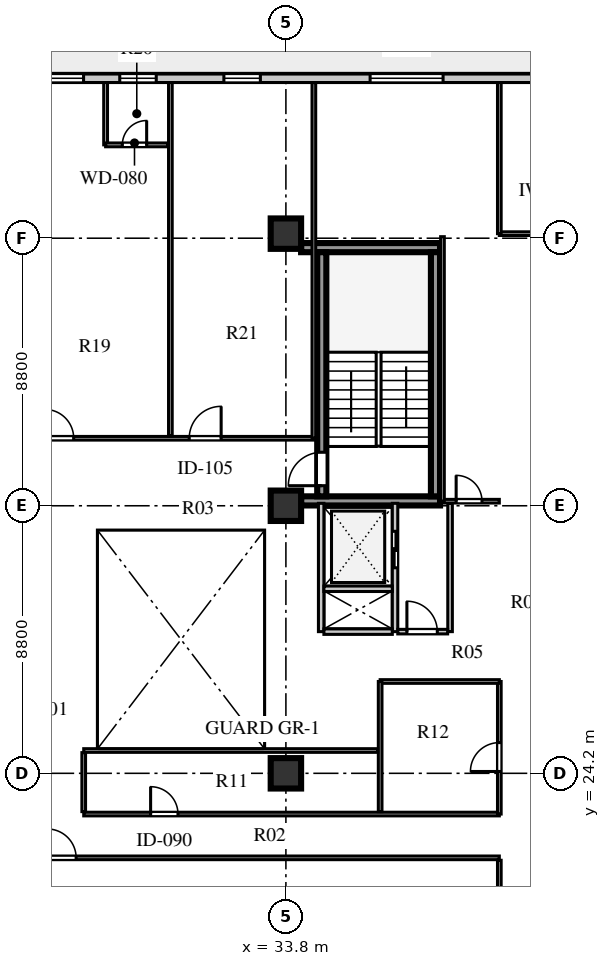
"""IFC4 building model, lengths in metres.
Left out: names, types, materials, properties, quantities, classifications, styles, units other than length and angle.
Written with IfcOpenShell. Run it as: python <this file> out.ifc"""

import sys

from ifc_helpers import new_model, si_unit, direction, frame, frame_2d, origin, origin_2d, place, context, subcontext, project, spatial, rectangle, extrude, element, fill, save


model = new_model("IFC4")
c1 = context("Model", 3, precision=1e-05, world=origin(), true_north=direction((0.0, 1.0)))
c2 = subcontext(c1, "Body", "Model", "MODEL_VIEW")
j1 = project(units=[si_unit("LENGTHUNIT", "METRE"), si_unit("PLANEANGLEUNIT", "RADIAN")], contexts=[c1])
p1 = place(None, origin())
s1 = spatial("IfcSite", under=j1, at=p1, CompositionType="ELEMENT")
p2 = place(p1, origin())
s2 = spatial("IfcBuilding", under=s1, at=p2, CompositionType="ELEMENT")
p3 = place(p2, frame((0.0, 0.0, 111.7)))
s3 = spatial("IfcBuildingStorey", under=s2, at=p3, CompositionType="ELEMENT", Elevation=111.7)
for number, where, z_axis, x_axis in (
    (1, (34.3, 33.16, 0.0), (0.0, 0.0, 1.0), (1.0, 0.0, 0.0)),
    (2, (34.3, 41.49, 0.0), (0.0, 0.0, 1.0), (1.0, 0.0, 0.0)),
):
    element("IfcWall", number, at=place(p3, frame(where, z_axis=z_axis, x_axis=x_axis)), inside=s3, PredefinedType="SHEAR", context=c2, shape_type="SweptSolid", body=[
        extrude(rectangle(XDim=4.57, YDim=0.3, at=frame_2d((2.285, 0.0))), origin(), (0.0, 0.0, 1.0), 3.6),
    ])
p4 = place(p3, frame((34.98, 33.31, 0.0), z_axis=(0.0, 0.0, 1.0), x_axis=(0.0, 1.0, 0.0)))
e3 = element("IfcWall", 3, at=p4, inside=s3, PredefinedType="SHEAR", context=c2, shape_type="SweptSolid", body=[
    extrude(rectangle(XDim=8.03, YDim=0.3, at=frame_2d((4.015, 0.0))), origin(), (0.0, 0.0, 1.0), 3.6),
])
p5 = place(p4, frame((0.35, 0.0, 0.0)))
e4 = element("IfcOpeningElement", 4, at=p5, cuts=e3, PredefinedType="OPENING", context=c2, shape_type="SweptSolid", body=[
    extrude(rectangle(XDim=1.1, YDim=2.1, at=frame_2d((0.55, 1.05))), frame((0.0, 0.16, 0.0), z_axis=(0.0, -1.0, 0.0), x_axis=(1.0, 0.0, 0.0)), (0.0, 0.0, 1.0), 0.32),
])
p6 = place(p3, frame((38.72, 33.31, 0.0), z_axis=(0.0, 0.0, 1.0), x_axis=(0.0, 1.0, 0.0)))
e5 = element("IfcWall", 5, at=p6, inside=s3, PredefinedType="SHEAR", context=c2, shape_type="SweptSolid", body=[
    extrude(rectangle(XDim=8.03, YDim=0.3, at=frame_2d((4.015, 0.0))), origin(), (0.0, 0.0, 1.0), 3.6),
])
for number, where, z_axis, x_axis in (
    (6, (33.8, 24.2, 0.0), (0.0, 0.0, 1.0), (1.0, 0.0, 0.0)),
    (7, (33.8, 33.0, 0.0), (0.0, 0.0, 1.0), (1.0, 0.0, 0.0)),
    (8, (33.8, 41.95, 0.0), (0.0, 0.0, 1.0), (1.0, 0.0, 0.0)),
):
    element("IfcColumn", number, at=place(p3, frame(where, z_axis=z_axis, x_axis=x_axis)), inside=s3, PredefinedType="COLUMN", context=c2, shape_type="SweptSolid", body=[
        extrude(rectangle(XDim=1.0, YDim=1.0, at=origin_2d()), origin(), (0.0, 0.0, 1.0), 3.6),
    ])
p7 = place(p3, frame((45.35, 47.06, 0.0), z_axis=(0.0, 0.0, 1.0), x_axis=(-1.0, 0.0, 0.0)))
e9 = element("IfcWall", 9, at=p7, inside=s3, PredefinedType="STANDARD", context=c2, shape_type="SweptSolid", body=[
    extrude(rectangle(XDim=32.1, YDim=0.28, at=frame_2d((16.05, 0.0))), origin(), (0.0, 0.0, 1.0), 3.6),
])
p8 = place(p7, frame((30.15, 0.0, 0.0)))
e10 = element("IfcOpeningElement", 10, at=p8, cuts=e9, PredefinedType="OPENING", context=c2, shape_type="SweptSolid", body=[
    extrude(rectangle(XDim=1.0, YDim=2.05, at=frame_2d((0.5, 1.025))), frame((0.0, 0.15, 0.0), z_axis=(0.0, -1.0, 0.0), x_axis=(1.0, 0.0, 0.0)), (0.0, 0.0, 1.0), 0.3),
])
p9 = place(p7, frame((24.045, 0.0, 0.8)))
e11 = element("IfcOpeningElement", 11, at=p9, cuts=e9, PredefinedType="OPENING", context=c2, shape_type="SweptSolid", body=[
    extrude(rectangle(XDim=2.25, YDim=2.0, at=frame_2d((1.125, 1.0))), frame((0.0, 0.15, 0.0), z_axis=(0.0, -1.0, 0.0), x_axis=(1.0, 0.0, 0.0)), (0.0, 0.0, 1.0), 0.3),
])
p10 = place(p7, frame((18.205, 0.0, 0.8)))
e12 = element("IfcOpeningElement", 12, at=p10, cuts=e9, PredefinedType="OPENING", context=c2, shape_type="SweptSolid", body=[
    extrude(rectangle(XDim=1.2, YDim=1.75, at=frame_2d((0.6, 0.875))), frame((0.0, 0.15, 0.0), z_axis=(0.0, -1.0, 0.0), x_axis=(1.0, 0.0, 0.0)), (0.0, 0.0, 1.0), 0.3),
])
p11 = place(p7, frame((15.815, 0.0, 0.8)))
e13 = element("IfcOpeningElement", 13, at=p11, cuts=e9, PredefinedType="OPENING", context=c2, shape_type="SweptSolid", body=[
    extrude(rectangle(XDim=1.2, YDim=1.75, at=frame_2d((0.6, 0.875))), frame((0.0, 0.15, 0.0), z_axis=(0.0, -1.0, 0.0), x_axis=(1.0, 0.0, 0.0)), (0.0, 0.0, 1.0), 0.3),
])
p12 = place(p7, frame((12.39, 0.0, 0.8)))
e14 = element("IfcOpeningElement", 14, at=p12, cuts=e9, PredefinedType="OPENING", context=c2, shape_type="SweptSolid", body=[
    extrude(rectangle(XDim=1.2, YDim=1.75, at=frame_2d((0.6, 0.875))), frame((0.0, 0.15, 0.0), z_axis=(0.0, -1.0, 0.0), x_axis=(1.0, 0.0, 0.0)), (0.0, 0.0, 1.0), 0.3),
])
p13 = place(p7, frame((6.38, 0.0, 0.8)))
e15 = element("IfcOpeningElement", 15, at=p13, cuts=e9, PredefinedType="OPENING", context=c2, shape_type="SweptSolid", body=[
    extrude(rectangle(XDim=2.4, YDim=2.05, at=frame_2d((1.2, 1.025))), frame((0.0, 0.15, 0.0), z_axis=(0.0, -1.0, 0.0), x_axis=(1.0, 0.0, 0.0)), (0.0, 0.0, 1.0), 0.3),
])
p14 = place(p7, frame((1.27, 0.0, 0.8)))
e16 = element("IfcOpeningElement", 16, at=p14, cuts=e9, PredefinedType="OPENING", context=c2, shape_type="SweptSolid", body=[
    extrude(rectangle(XDim=2.1, YDim=1.95, at=frame_2d((1.05, 0.975))), frame((0.0, 0.15, 0.0), z_axis=(0.0, -1.0, 0.0), x_axis=(1.0, 0.0, 0.0)), (0.0, 0.0, 1.0), 0.3),
])
p15 = place(p3, frame((34.96, 28.86, 0.0), z_axis=(0.0, 0.0, 1.0), x_axis=(0.0, 1.0, 0.0)))
e17 = element("IfcWall", 17, at=p15, inside=s3, PredefinedType="SOLIDWALL", context=c2, shape_type="SweptSolid", body=[
    extrude(rectangle(XDim=4.22, YDim=0.18, at=frame_2d((2.11, 0.0))), origin(), (0.0, 0.0, 1.0), 3.6),
])
p16 = place(p3, frame((37.39, 28.86, 0.0), z_axis=(0.0, 0.0, 1.0), x_axis=(0.0, 1.0, 0.0)))
e18 = element("IfcWall", 18, at=p16, inside=s3, PredefinedType="SOLIDWALL", context=c2, shape_type="SweptSolid", body=[
    extrude(rectangle(XDim=4.22, YDim=0.18, at=frame_2d((2.11, 0.0))), origin(), (0.0, 0.0, 1.0), 3.6),
])
p17 = place(p16, frame((2.1, 0.0, 0.0)))
e19 = element("IfcOpeningElement", 19, at=p17, cuts=e18, PredefinedType="OPENING", context=c2, shape_type="SweptSolid", body=[
    extrude(rectangle(XDim=1.2, YDim=2.12, at=frame_2d((0.6, 1.06))), frame((0.0, 0.1, 0.0), z_axis=(0.0, -1.0, 0.0), x_axis=(1.0, 0.0, 0.0)), (0.0, 0.0, 1.0), 0.2),
])
for number, where, z_axis, x_axis in (
    (20, (35.05, 28.86, 0.0), (0.0, 0.0, 1.0), (1.0, 0.0, 0.0)),
    (21, (35.05, 30.27, 0.0), (0.0, 0.0, 1.0), (1.0, 0.0, 0.0)),
):
    element("IfcWall", number, at=place(p3, frame(where, z_axis=z_axis, x_axis=x_axis)), inside=s3, PredefinedType="SOLIDWALL", context=c2, shape_type="SweptSolid", body=[
        extrude(rectangle(XDim=2.25, YDim=0.18, at=frame_2d((1.125, 0.0))), origin(), (0.0, 0.0, 1.0), 3.6),
    ])
p18 = place(p3, frame((39.2, 28.86, 0.0), z_axis=(0.0, 0.0, 1.0), x_axis=(0.0, 1.0, 0.0)))
e22 = element("IfcWall", 22, at=p18, inside=s3, PredefinedType="PARTITIONING", context=c2, shape_type="SweptSolid", body=[
    extrude(rectangle(XDim=4.22, YDim=0.15, at=frame_2d((2.11, 0.0))), origin(), (0.0, 0.0, 1.0), 3.6),
])
p19 = place(p3, frame((37.48, 28.86, 0.0), z_axis=(0.0, 0.0, 1.0), x_axis=(1.0, 0.0, 0.0)))
e23 = element("IfcWall", 23, at=p19, inside=s3, PredefinedType="PARTITIONING", context=c2, shape_type="SweptSolid", body=[
    extrude(rectangle(XDim=1.64, YDim=0.15, at=frame_2d((0.82, 0.0))), origin(), (0.0, 0.0, 1.0), 3.6),
])
p20 = place(p19, frame((0.3, 0.0, 0.0)))
e24 = element("IfcOpeningElement", 24, at=p20, cuts=e23, PredefinedType="OPENING", context=c2, shape_type="SweptSolid", body=[
    extrude(rectangle(XDim=1.0, YDim=2.1, at=frame_2d((0.5, 1.05))), frame((0.0, 0.085, 0.0), z_axis=(0.0, -1.0, 0.0), x_axis=(1.0, 0.0, 0.0)), (0.0, 0.0, 1.0), 0.17),
])
p21 = place(p3, frame((25.22, 21.42, 0.0), z_axis=(0.0, 0.0, 1.0), x_axis=(1.0, 0.0, 0.0)))
e25 = element("IfcWall", 25, at=p21, inside=s3, PredefinedType="PARTITIONING", context=c2, shape_type="SweptSolid", body=[
    extrude(rectangle(XDim=15.6, YDim=0.12, at=frame_2d((7.8, 0.0))), origin(), (0.0, 0.0, 1.0), 3.2),
])
p22 = place(p21, frame((0.73, 0.0, 0.0)))
e26 = element("IfcOpeningElement", 26, at=p22, cuts=e25, PredefinedType="OPENING", context=c2, shape_type="SweptSolid", body=[
    extrude(rectangle(XDim=0.95, YDim=2.1, at=frame_2d((0.475, 1.05))), frame((0.0, 0.07, 0.0), z_axis=(0.0, -1.0, 0.0), x_axis=(1.0, 0.0, 0.0)), (0.0, 0.0, 1.0), 0.14),
])
p23 = place(p3, frame((27.15, 22.86, 0.0), z_axis=(0.0, 0.0, 1.0), x_axis=(1.0, 0.0, 0.0)))
e27 = element("IfcWall", 27, at=p23, inside=s3, PredefinedType="PARTITIONING", context=c2, shape_type="SweptSolid", body=[
    extrude(rectangle(XDim=13.67, YDim=0.12, at=frame_2d((6.835, 0.0))), origin(), (0.0, 0.0, 1.0), 3.6),
])
p24 = place(p23, frame((2.2, 0.0, 0.0)))
e28 = element("IfcOpeningElement", 28, at=p24, cuts=e27, PredefinedType="OPENING", context=c2, shape_type="SweptSolid", body=[
    extrude(rectangle(XDim=0.9, YDim=2.08, at=frame_2d((0.45, 1.04))), frame((0.0, 0.07, 0.0), z_axis=(0.0, -1.0, 0.0), x_axis=(1.0, 0.0, 0.0)), (0.0, 0.0, 1.0), 0.14),
])
p25 = place(p3, frame((25.22, 35.22, 0.0), z_axis=(0.0, 0.0, 1.0), x_axis=(1.0, 0.0, 0.0)))
e29 = element("IfcWall", 29, at=p25, inside=s3, PredefinedType="PARTITIONING", context=c2, shape_type="SweptSolid", body=[
    extrude(rectangle(XDim=9.5, YDim=0.12, at=frame_2d((4.75, 0.0))), origin(), (0.0, 0.0, 1.0), 3.6),
])
p26 = place(p25, frame((0.65, 0.0, 0.0)))
e30 = element("IfcOpeningElement", 30, at=p26, cuts=e29, PredefinedType="OPENING", context=c2, shape_type="SweptSolid", body=[
    extrude(rectangle(XDim=0.95, YDim=2.1, at=frame_2d((0.475, 1.05))), frame((0.0, 0.07, 0.0), z_axis=(0.0, -1.0, 0.0), x_axis=(1.0, 0.0, 0.0)), (0.0, 0.0, 1.0), 0.14),
])
p27 = place(p25, frame((5.4, 0.0, 0.0)))
e31 = element("IfcOpeningElement", 31, at=p27, cuts=e29, PredefinedType="OPENING", context=c2, shape_type="SweptSolid", body=[
    extrude(rectangle(XDim=1.05, YDim=2.1, at=frame_2d((0.525, 1.05))), frame((0.0, 0.07, 0.0), z_axis=(0.0, -1.0, 0.0), x_axis=(1.0, 0.0, 0.0)), (0.0, 0.0, 1.0), 0.14),
])
p28 = place(p3, frame((40.82, 41.95, 0.0), z_axis=(0.0, 0.0, 1.0), x_axis=(1.0, 0.0, 0.0)))
e32 = element("IfcWall", 32, at=p28, inside=s3, PredefinedType="PARTITIONING", context=c2, shape_type="SweptSolid", body=[
    extrude(rectangle(XDim=7.3, YDim=0.12, at=frame_2d((3.65, 0.0))), origin(), (0.0, 0.0, 1.0), 2.95),
])
p29 = place(p3, frame((40.82, 22.86, 0.0), z_axis=(0.0, 0.0, 1.0), x_axis=(0.0, 1.0, 0.0)))
e33 = element("IfcWall", 33, at=p29, inside=s3, PredefinedType="PARTITIONING", context=c2, shape_type="SweptSolid", body=[
    extrude(rectangle(XDim=4.36, YDim=0.12, at=frame_2d((2.18, 0.0))), origin(), (0.0, 0.0, 1.0), 3.6),
])
p30 = place(p29, frame((1.4, 0.0, 0.0)))
e34 = element("IfcOpeningElement", 34, at=p30, cuts=e33, PredefinedType="OPENING", context=c2, shape_type="SweptSolid", body=[
    extrude(rectangle(XDim=0.95, YDim=2.1, at=frame_2d((0.475, 1.05))), frame((0.0, 0.07, 0.0), z_axis=(0.0, -1.0, 0.0), x_axis=(1.0, 0.0, 0.0)), (0.0, 0.0, 1.0), 0.14),
])
p31 = place(p3, frame((36.9, 27.22, 0.0), z_axis=(0.0, 0.0, 1.0), x_axis=(1.0, 0.0, 0.0)))
e35 = element("IfcWall", 35, at=p31, inside=s3, PredefinedType="PARTITIONING", context=c2, shape_type="SweptSolid", body=[
    extrude(rectangle(XDim=3.92, YDim=0.12, at=frame_2d((1.96, 0.0))), origin(), (0.0, 0.0, 1.0), 3.2),
])
p32 = place(p3, frame((36.9, 22.94, 0.0), z_axis=(0.0, 0.0, 1.0), x_axis=(0.0, 1.0, 0.0)))
e36 = element("IfcWall", 36, at=p32, inside=s3, PredefinedType="PARTITIONING", context=c2, shape_type="SweptSolid", body=[
    extrude(rectangle(XDim=4.28, YDim=0.12, at=frame_2d((2.14, 0.0))), origin(), (0.0, 0.0, 1.0), 3.6),
])
p33 = place(p3, frame((27.15, 24.95, 0.0), z_axis=(0.0, 0.0, 1.0), x_axis=(1.0, 0.0, 0.0)))
e37 = element("IfcWall", 37, at=p33, inside=s3, PredefinedType="PARTITIONING", context=c2, shape_type="SweptSolid", body=[
    extrude(rectangle(XDim=9.67, YDim=0.12, at=frame_2d((4.835, 0.0))), origin(), (0.0, 0.0, 1.0), 3.05),
])
p34 = place(p3, frame((27.15, 22.94, 0.0), z_axis=(0.0, 0.0, 1.0), x_axis=(0.0, 1.0, 0.0)))
e38 = element("IfcWall", 38, at=p34, inside=s3, PredefinedType="PARTITIONING", context=c2, shape_type="SweptSolid", body=[
    extrude(rectangle(XDim=1.94, YDim=0.12, at=frame_2d((0.97, 0.0))), origin(), (0.0, 0.0, 1.0), 3.6),
])
p35 = place(p3, frame((40.82, 10.28, 0.0), z_axis=(0.0, 0.0, 1.0), x_axis=(0.0, 1.0, 0.0)))
e39 = element("IfcWall", 39, at=p35, inside=s3, PredefinedType="PARTITIONING", context=c2, shape_type="SweptSolid", body=[
    extrude(rectangle(XDim=11.06, YDim=0.12, at=frame_2d((5.53, 0.0))), origin(), (0.0, 0.0, 1.0), 3.6),
])
p36 = place(p3, frame((34.72, 35.22, 0.0), z_axis=(0.0, 0.0, 1.0), x_axis=(0.0, 1.0, 0.0)))
e40 = element("IfcWall", 40, at=p36, inside=s3, PredefinedType="PARTITIONING", context=c2, shape_type="SweptSolid", body=[
    extrude(rectangle(XDim=11.7, YDim=0.12, at=frame_2d((5.85, 0.0))), origin(), (0.0, 0.0, 1.0), 3.6),
])
p37 = place(p3, frame((30.0, 35.3, 0.0), z_axis=(0.0, 0.0, 1.0), x_axis=(0.0, 1.0, 0.0)))
e41 = element("IfcWall", 41, at=p37, inside=s3, PredefinedType="PARTITIONING", context=c2, shape_type="SweptSolid", body=[
    extrude(rectangle(XDim=11.62, YDim=0.12, at=frame_2d((5.81, 0.0))), origin(), (0.0, 0.0, 1.0), 3.6),
])
p38 = place(p3, frame((27.87, 44.87, 0.0), z_axis=(0.0, 0.0, 1.0), x_axis=(0.0, 1.0, 0.0)))
e42 = element("IfcWall", 42, at=p38, inside=s3, PredefinedType="PLUMBINGWALL", context=c2, shape_type="SweptSolid", body=[
    extrude(rectangle(XDim=2.05, YDim=0.125, at=frame_2d((1.025, 0.0))), origin(), (0.0, 0.0, 1.0), 3.6),
])
p39 = place(p3, frame((27.87, 44.87, 0.0), z_axis=(0.0, 0.0, 1.0), x_axis=(1.0, 0.0, 0.0)))
e43 = element("IfcWall", 43, at=p39, inside=s3, PredefinedType="PLUMBINGWALL", context=c2, shape_type="SweptSolid", body=[
    extrude(rectangle(XDim=2.05, YDim=0.125, at=frame_2d((1.025, 0.0))), origin(), (0.0, 0.0, 1.0), 3.6),
])
p40 = place(p39, frame((0.55, 0.0, 0.0)))
e44 = element("IfcOpeningElement", 44, at=p40, cuts=e43, PredefinedType="OPENING", context=c2, shape_type="SweptSolid", body=[
    extrude(rectangle(XDim=0.8, YDim=2.05, at=frame_2d((0.4, 1.025))), frame((0.0, 0.073, 0.0), z_axis=(0.0, -1.0, 0.0), x_axis=(1.0, 0.0, 0.0)), (0.0, 0.0, 1.0), 0.145),
])
p41 = place(p3, frame((38.95, 33.15, 0.0), z_axis=(0.0, 0.0, 1.0), x_axis=(1.0, 0.0, 0.0)))
e45 = element("IfcWall", 45, at=p41, inside=s3, PredefinedType="PARTITIONING", context=c2, shape_type="SweptSolid", body=[
    extrude(rectangle(XDim=1.87, YDim=0.12, at=frame_2d((0.935, 0.0))), origin(), (0.0, 0.0, 1.0), 3.6),
])
p42 = place(p41, frame((0.45, 0.0, 0.0)))
e46 = element("IfcOpeningElement", 46, at=p42, cuts=e45, PredefinedType="OPENING", context=c2, shape_type="SweptSolid", body=[
    extrude(rectangle(XDim=0.85, YDim=2.05, at=frame_2d((0.425, 1.025))), frame((0.0, 0.07, 0.0), z_axis=(0.0, -1.0, 0.0), x_axis=(1.0, 0.0, 0.0)), (0.0, 0.0, 1.0), 0.14),
])
p43 = place(p3, frame((38.95, 33.15, 0.0), z_axis=(0.0, 0.0, 1.0), x_axis=(0.0, 1.0, 0.0)))
e47 = element("IfcWall", 47, at=p43, inside=s3, PredefinedType="PARTITIONING", context=c2, shape_type="SweptSolid", body=[
    extrude(rectangle(XDim=8.7, YDim=0.12, at=frame_2d((4.35, 0.0))), origin(), (0.0, 0.0, 1.0), 3.6),
])
p44 = place(p3, frame((40.82, 41.95, 0.0), z_axis=(0.0, 0.0, 1.0), x_axis=(0.0, 1.0, 0.0)))
e48 = element("IfcWall", 48, at=p44, inside=s3, PredefinedType="PARTITIONING", context=c2, shape_type="SweptSolid", body=[
    extrude(rectangle(XDim=4.97, YDim=0.12, at=frame_2d((2.485, 0.0))), origin(), (0.0, 0.0, 1.0), 3.6),
])
p45 = place(p10, origin())
e49 = element("IfcWindow", 49, at=p45, inside=s3, PartitioningType="SINGLE_PANEL", PredefinedType="WINDOW", context=c2, shape_type="SweptSolid", body=[
    extrude(rectangle(XDim=1.2, YDim=1.75, at=frame_2d((0.6, 0.875))), frame((0.0, 0.03, 0.0), z_axis=(0.0, -1.0, 0.0), x_axis=(1.0, 0.0, 0.0)), (0.0, 0.0, 1.0), 0.06),
])
fill(e12, e49)
p46 = place(p11, origin())
e50 = element("IfcWindow", 50, at=p46, inside=s3, PartitioningType="SINGLE_PANEL", PredefinedType="WINDOW", context=c2, shape_type="SweptSolid", body=[
    extrude(rectangle(XDim=1.2, YDim=1.75, at=frame_2d((0.6, 0.875))), frame((0.0, 0.03, 0.0), z_axis=(0.0, -1.0, 0.0), x_axis=(1.0, 0.0, 0.0)), (0.0, 0.0, 1.0), 0.06),
])
fill(e13, e50)
p47 = place(p12, origin())
e51 = element("IfcWindow", 51, at=p47, inside=s3, PartitioningType="SINGLE_PANEL", PredefinedType="WINDOW", context=c2, shape_type="SweptSolid", body=[
    extrude(rectangle(XDim=1.2, YDim=1.75, at=frame_2d((0.6, 0.875))), frame((0.0, 0.03, 0.0), z_axis=(0.0, -1.0, 0.0), x_axis=(1.0, 0.0, 0.0)), (0.0, 0.0, 1.0), 0.06),
])
fill(e14, e51)
p48 = place(p13, origin())
e52 = element("IfcWindow", 52, at=p48, inside=s3, PartitioningType="SINGLE_PANEL", PredefinedType="WINDOW", context=c2, shape_type="SweptSolid", body=[
    extrude(rectangle(XDim=2.4, YDim=2.05, at=frame_2d((1.2, 1.025))), frame((0.0, 0.03, 0.0), z_axis=(0.0, -1.0, 0.0), x_axis=(1.0, 0.0, 0.0)), (0.0, 0.0, 1.0), 0.06),
])
fill(e15, e52)
p49 = place(p5, origin())
e53 = element("IfcDoor", 53, at=p49, inside=s3, OperationType="SINGLE_SWING_LEFT", PredefinedType="DOOR", context=c2, shape_type="SweptSolid", body=[
    extrude(rectangle(XDim=1.1, YDim=2.1, at=frame_2d((0.55, 1.05))), frame((0.0, 0.025, 0.0), z_axis=(0.0, -1.0, 0.0), x_axis=(1.0, 0.0, 0.0)), (0.0, 0.0, 1.0), 0.05),
])
fill(e4, e53)
p50 = place(p17, frame((1.2, 0.0, 0.0), z_axis=(0.0, 0.0, 1.0), x_axis=(-1.0, 0.0, 0.0)))
e54 = element("IfcDoor", 54, at=p50, inside=s3, OperationType="DOUBLE_DOOR_SLIDING", PredefinedType="DOOR", context=c2, shape_type="SweptSolid", body=[
    extrude(rectangle(XDim=1.2, YDim=2.12, at=frame_2d((0.6, 1.06))), frame((0.0, 0.025, 0.0), z_axis=(0.0, -1.0, 0.0), x_axis=(1.0, 0.0, 0.0)), (0.0, 0.0, 1.0), 0.05),
])
fill(e19, e54)
p51 = place(p20, origin())
e55 = element("IfcDoor", 55, at=p51, inside=s3, OperationType="SINGLE_SWING_LEFT", PredefinedType="DOOR", context=c2, shape_type="SweptSolid", body=[
    extrude(rectangle(XDim=1.0, YDim=2.1, at=frame_2d((0.5, 1.05))), frame((0.0, 0.025, 0.0), z_axis=(0.0, -1.0, 0.0), x_axis=(1.0, 0.0, 0.0)), (0.0, 0.0, 1.0), 0.05),
])
fill(e24, e55)
p52 = place(p24, origin())
e56 = element("IfcDoor", 56, at=p52, inside=s3, OperationType="SINGLE_SWING_LEFT", PredefinedType="DOOR", context=c2, shape_type="SweptSolid", body=[
    extrude(rectangle(XDim=0.9, YDim=2.08, at=frame_2d((0.45, 1.04))), frame((0.0, 0.025, 0.0), z_axis=(0.0, -1.0, 0.0), x_axis=(1.0, 0.0, 0.0)), (0.0, 0.0, 1.0), 0.05),
])
fill(e28, e56)
p53 = place(p30, frame((0.95, 0.0, 0.0), z_axis=(0.0, 0.0, 1.0), x_axis=(-1.0, 0.0, 0.0)))
e57 = element("IfcDoor", 57, at=p53, inside=s3, OperationType="SINGLE_SWING_RIGHT", PredefinedType="DOOR", context=c2, shape_type="SweptSolid", body=[
    extrude(rectangle(XDim=0.95, YDim=2.1, at=frame_2d((0.475, 1.05))), frame((0.0, 0.025, 0.0), z_axis=(0.0, -1.0, 0.0), x_axis=(1.0, 0.0, 0.0)), (0.0, 0.0, 1.0), 0.05),
])
fill(e34, e57)
p54 = place(p22, frame((0.95, 0.0, 0.0), z_axis=(0.0, 0.0, 1.0), x_axis=(-1.0, 0.0, 0.0)))
e58 = element("IfcDoor", 58, at=p54, inside=s3, OperationType="SINGLE_SWING_RIGHT", PredefinedType="DOOR", context=c2, shape_type="SweptSolid", body=[
    extrude(rectangle(XDim=0.95, YDim=2.1, at=frame_2d((0.475, 1.05))), frame((0.0, 0.025, 0.0), z_axis=(0.0, -1.0, 0.0), x_axis=(1.0, 0.0, 0.0)), (0.0, 0.0, 1.0), 0.05),
])
fill(e26, e58)
p55 = place(p26, origin())
e59 = element("IfcDoor", 59, at=p55, inside=s3, OperationType="SINGLE_SWING_LEFT", PredefinedType="DOOR", context=c2, shape_type="SweptSolid", body=[
    extrude(rectangle(XDim=0.95, YDim=2.1, at=frame_2d((0.475, 1.05))), frame((0.0, 0.025, 0.0), z_axis=(0.0, -1.0, 0.0), x_axis=(1.0, 0.0, 0.0)), (0.0, 0.0, 1.0), 0.05),
])
fill(e30, e59)
p56 = place(p40, frame((0.8, 0.0, 0.0), z_axis=(0.0, 0.0, 1.0), x_axis=(-1.0, 0.0, 0.0)))
e60 = element("IfcDoor", 60, at=p56, inside=s3, OperationType="SINGLE_SWING_LEFT", PredefinedType="DOOR", context=c2, shape_type="SweptSolid", body=[
    extrude(rectangle(XDim=0.8, YDim=2.05, at=frame_2d((0.4, 1.025))), frame((0.0, 0.025, 0.0), z_axis=(0.0, -1.0, 0.0), x_axis=(1.0, 0.0, 0.0)), (0.0, 0.0, 1.0), 0.05),
])
fill(e44, e60)
p57 = place(p27, origin())
e61 = element("IfcDoor", 61, at=p57, inside=s3, OperationType="SINGLE_SWING_RIGHT", PredefinedType="DOOR", context=c2, shape_type="SweptSolid", body=[
    extrude(rectangle(XDim=1.05, YDim=2.1, at=frame_2d((0.525, 1.05))), frame((0.0, 0.025, 0.0), z_axis=(0.0, -1.0, 0.0), x_axis=(1.0, 0.0, 0.0)), (0.0, 0.0, 1.0), 0.05),
])
fill(e31, e61)
p58 = place(p42, origin())
e62 = element("IfcDoor", 62, at=p58, inside=s3, OperationType="SINGLE_SWING_LEFT", PredefinedType="DOOR", context=c2, shape_type="SweptSolid", body=[
    extrude(rectangle(XDim=0.85, YDim=2.05, at=frame_2d((0.425, 1.025))), frame((0.0, 0.025, 0.0), z_axis=(0.0, -1.0, 0.0), x_axis=(1.0, 0.0, 0.0)), (0.0, 0.0, 1.0), 0.05),
])
fill(e46, e62)
save(model, sys.argv[1])
